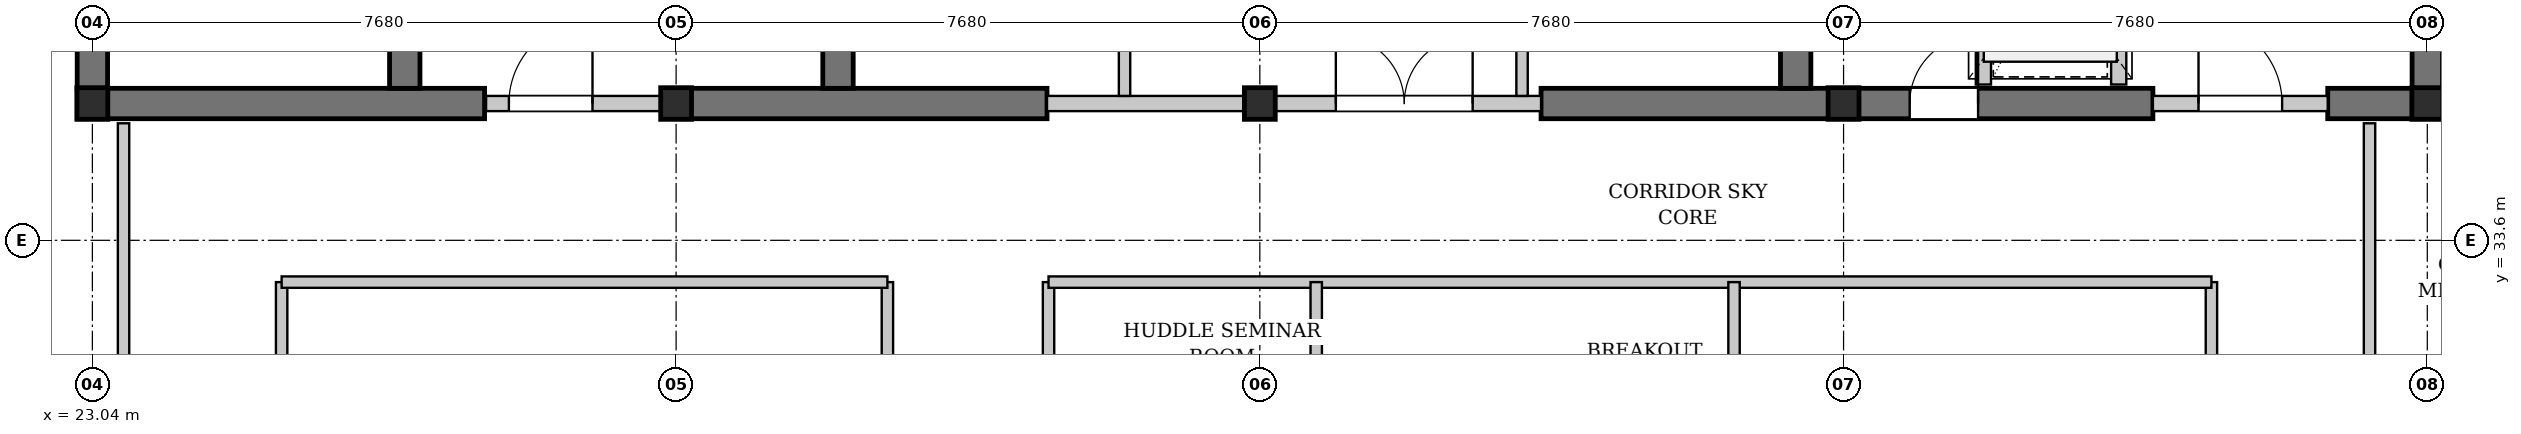
"""IFC4 building model, lengths in metres.
Left out: names, types, materials, properties, quantities, classifications, styles, units other than length and angle.
Written with IfcOpenShell. Run it as: python <this file> out.ifc"""

import sys

from ifc_helpers import new_model, si_unit, direction, frame, frame_2d, origin, origin_2d, place, context, subcontext, project, spatial, rectangle, i_section, extrude, element, fill, save


model = new_model("IFC4")
c1 = context("Model", 3, precision=1e-05, world=origin(), true_north=direction((0.0, 1.0)))
c2 = subcontext(c1, "Body", "Model", "MODEL_VIEW")
j1 = project(units=[si_unit("LENGTHUNIT", "METRE"), si_unit("PLANEANGLEUNIT", "RADIAN")], contexts=[c1])
p1 = place(None, origin())
s1 = spatial("IfcSite", under=j1, at=p1, CompositionType="ELEMENT")
p2 = place(p1, origin())
s2 = spatial("IfcBuilding", under=s1, at=p2, CompositionType="ELEMENT")
p3 = place(p2, frame((0.0, 0.0, 265.9)))
s3 = spatial("IfcBuildingStorey", under=s2, at=p3, CompositionType="ELEMENT", Elevation=265.9)
p4 = place(p3, frame((22.84, 35.4, 0.0), z_axis=(0.0, 0.0, 1.0), x_axis=(1.0, 0.0, 0.0)))
e1 = element("IfcWall", 1, at=p4, inside=s3, PredefinedType="SHEAR", context=c2, shape_type="SweptSolid", body=[
    extrude(rectangle(XDim=5.36, YDim=0.4, at=frame_2d((2.68, 0.0))), origin(), (0.0, 0.0, 1.0), 3.18),
])
p5 = place(p3, frame((30.72, 35.4, 0.0), z_axis=(0.0, 0.0, 1.0), x_axis=(1.0, 0.0, 0.0)))
e2 = element("IfcWall", 2, at=p5, inside=s3, PredefinedType="SHEAR", context=c2, shape_type="SweptSolid", body=[
    extrude(rectangle(XDim=4.88, YDim=0.4, at=frame_2d((2.44, 0.0))), origin(), (0.0, 0.0, 1.0), 3.18),
])
p6 = place(p3, frame((42.1, 35.4, 0.0), z_axis=(0.0, 0.0, 1.0), x_axis=(1.0, 0.0, 0.0)))
e3 = element("IfcWall", 3, at=p6, inside=s3, PredefinedType="SHEAR", context=c2, shape_type="SweptSolid", body=[
    extrude(rectangle(XDim=8.05, YDim=0.4, at=frame_2d((4.025, 0.0))), origin(), (0.0, 0.0, 1.0), 3.18),
])
p7 = place(p6, frame((4.85, 0.0, 0.0)))
e4 = element("IfcOpeningElement", 4, at=p7, cuts=e3, PredefinedType="OPENING", context=c2, shape_type="SweptSolid", body=[
    extrude(rectangle(XDim=0.9, YDim=2.15, at=frame_2d((0.45, 1.075))), frame((0.0, 0.21, 0.0), z_axis=(0.0, -1.0, 0.0), x_axis=(1.0, 0.0, 0.0)), (0.0, 0.0, 1.0), 0.42),
])
p8 = place(p3, frame((52.45, 35.4, 0.0), z_axis=(0.0, 0.0, 1.0), x_axis=(1.0, 0.0, 0.0)))
e5 = element("IfcWall", 5, at=p8, inside=s3, PredefinedType="SHEAR", context=c2, shape_type="SweptSolid", body=[
    extrude(rectangle(XDim=1.51, YDim=0.4, at=frame_2d((0.755, 0.0))), origin(), (0.0, 0.0, 1.0), 3.18),
])
p9 = place(p3, frame((23.04, 35.6, 0.0), z_axis=(0.0, 0.0, 1.0), x_axis=(0.0, 1.0, 0.0)))
e6 = element("IfcWall", 6, at=p9, inside=s3, PredefinedType="SHEAR", context=c2, shape_type="SweptSolid", body=[
    extrude(rectangle(XDim=10.4, YDim=0.4, at=frame_2d((5.2, 0.0))), origin(), (0.0, 0.0, 1.0), 3.18),
])
p10 = place(p3, frame((27.15, 35.6, 0.0), z_axis=(0.0, 0.0, 1.0), x_axis=(0.0, 1.0, 0.0)))
e7 = element("IfcWall", 7, at=p10, inside=s3, PredefinedType="SHEAR", context=c2, shape_type="SweptSolid", body=[
    extrude(rectangle(XDim=10.4, YDim=0.4, at=frame_2d((5.2, 0.0))), origin(), (0.0, 0.0, 1.0), 3.18),
])
p11 = place(p10, frame((0.7, 0.0, 0.0)))
e8 = element("IfcOpeningElement", 8, at=p11, cuts=e7, PredefinedType="OPENING", context=c2, shape_type="SweptSolid", body=[
    extrude(rectangle(XDim=1.1, YDim=2.15, at=frame_2d((0.55, 1.075))), frame((0.0, 0.21, 0.0), z_axis=(0.0, -1.0, 0.0), x_axis=(1.0, 0.0, 0.0)), (0.0, 0.0, 1.0), 0.42),
])
for number, where, z_axis, x_axis in (
    (9, (32.85, 35.6, 0.0), (0.0, 0.0, 1.0), (0.0, 1.0, 0.0)),
    (10, (45.45, 35.6, 0.0), (0.0, 0.0, 1.0), (0.0, 1.0, 0.0)),
    (11, (53.76, 35.6, 0.0), (0.0, 0.0, 1.0), (0.0, 1.0, 0.0)),
):
    element("IfcWall", number, at=place(p3, frame(where, z_axis=z_axis, x_axis=x_axis)), inside=s3, PredefinedType="SHEAR", context=c2, shape_type="SweptSolid", body=[
        extrude(rectangle(XDim=10.4, YDim=0.4, at=frame_2d((5.2, 0.0))), origin(), (0.0, 0.0, 1.0), 3.18),
    ])
for number, where, z_axis, x_axis in (
    (12, (23.04, 35.4, 0.0), (0.0, 0.0, 1.0), (1.0, 0.0, 0.0)),
    (13, (30.72, 35.4, 0.0), (0.0, 0.0, 1.0), (1.0, 0.0, 0.0)),
    (14, (38.4, 35.4, 0.0), (0.0, 0.0, 1.0), (1.0, 0.0, 0.0)),
    (15, (46.08, 35.4, 0.0), (0.0, 0.0, 1.0), (1.0, 0.0, 0.0)),
    (16, (53.76, 35.4, 0.0), (0.0, 0.0, 1.0), (1.0, 0.0, 0.0)),
):
    element("IfcColumn", number, at=place(p3, frame(where, z_axis=z_axis, x_axis=x_axis)), inside=s3, PredefinedType="COLUMN", context=c2, shape_type="SweptSolid", body=[
        extrude(i_section(OverallWidth=0.406, OverallDepth=0.416, WebThickness=0.03, FlangeThickness=0.048, FilletRadius=0.015, at=origin_2d()), origin(), (0.0, 0.0, 1.0), 3.4),
    ])
p12 = place(p3, frame((28.22, 35.4, 0.0), z_axis=(0.0, 0.0, 1.0), x_axis=(1.0, 0.0, 0.0)))
e17 = element("IfcWall", 17, at=p12, inside=s3, PredefinedType="PARTITIONING", context=c2, shape_type="SweptSolid", body=[
    extrude(rectangle(XDim=2.5, YDim=0.2, at=frame_2d((1.25, 0.0))), origin(), (0.0, 0.0, 1.0), 2.575),
])
p13 = place(p12, frame((0.3, 0.0, 0.0)))
e18 = element("IfcOpeningElement", 18, at=p13, cuts=e17, PredefinedType="OPENING", context=c2, shape_type="SweptSolid", body=[
    extrude(rectangle(XDim=1.1, YDim=2.15, at=frame_2d((0.55, 1.075))), frame((0.0, 0.11, 0.0), z_axis=(0.0, -1.0, 0.0), x_axis=(1.0, 0.0, 0.0)), (0.0, 0.0, 1.0), 0.22),
])
p14 = place(p3, frame((35.6, 35.4, 0.0), z_axis=(0.0, 0.0, 1.0), x_axis=(1.0, 0.0, 0.0)))
e19 = element("IfcWall", 19, at=p14, inside=s3, PredefinedType="PARTITIONING", context=c2, shape_type="SweptSolid", body=[
    extrude(rectangle(XDim=6.5, YDim=0.2, at=frame_2d((3.25, 0.0))), origin(), (0.0, 0.0, 1.0), 2.575),
])
p15 = place(p14, frame((3.8, 0.0, 0.0)))
e20 = element("IfcOpeningElement", 20, at=p15, cuts=e19, PredefinedType="OPENING", context=c2, shape_type="SweptSolid", body=[
    extrude(rectangle(XDim=1.8, YDim=2.3, at=frame_2d((0.9, 1.15))), frame((0.0, 0.11, 0.0), z_axis=(0.0, -1.0, 0.0), x_axis=(1.0, 0.0, 0.0)), (0.0, 0.0, 1.0), 0.22),
])
p16 = place(p3, frame((36.62, 35.5, 0.0), z_axis=(0.0, 0.0, 1.0), x_axis=(0.0, 1.0, 0.0)))
e21 = element("IfcWall", 21, at=p16, inside=s3, PredefinedType="PARTITIONING", context=c2, shape_type="SweptSolid", body=[
    extrude(rectangle(XDim=10.42, YDim=0.15, at=frame_2d((5.21, 0.0))), origin(), (0.0, 0.0, 1.0), 3.18),
])
p17 = place(p16, frame((3.92, 0.0, 0.0)))
e22 = element("IfcOpeningElement", 22, at=p17, cuts=e21, PredefinedType="OPENING", context=c2, shape_type="SweptSolid", body=[
    extrude(rectangle(XDim=0.9, YDim=2.15, at=frame_2d((0.45, 1.075))), frame((0.0, 0.085, 0.0), z_axis=(0.0, -1.0, 0.0), x_axis=(1.0, 0.0, 0.0)), (0.0, 0.0, 1.0), 0.17),
])
p18 = place(p16, frame((5.85, 0.0, 0.0)))
e23 = element("IfcOpeningElement", 23, at=p18, cuts=e21, PredefinedType="OPENING", context=c2, shape_type="SweptSolid", body=[
    extrude(rectangle(XDim=0.9, YDim=2.15, at=frame_2d((0.45, 1.075))), frame((0.0, 0.085, 0.0), z_axis=(0.0, -1.0, 0.0), x_axis=(1.0, 0.0, 0.0)), (0.0, 0.0, 1.0), 0.17),
])
p19 = place(p3, frame((41.85, 35.5, 0.0), z_axis=(0.0, 0.0, 1.0), x_axis=(0.0, 1.0, 0.0)))
e24 = element("IfcWall", 24, at=p19, inside=s3, PredefinedType="PARTITIONING", context=c2, shape_type="SweptSolid", body=[
    extrude(rectangle(XDim=10.42, YDim=0.15, at=frame_2d((5.21, 0.0))), origin(), (0.0, 0.0, 1.0), 3.18),
])
p20 = place(p19, frame((3.92, 0.0, 0.0)))
e25 = element("IfcOpeningElement", 25, at=p20, cuts=e24, PredefinedType="OPENING", context=c2, shape_type="SweptSolid", body=[
    extrude(rectangle(XDim=0.9, YDim=2.15, at=frame_2d((0.45, 1.075))), frame((0.0, 0.085, 0.0), z_axis=(0.0, -1.0, 0.0), x_axis=(1.0, 0.0, 0.0)), (0.0, 0.0, 1.0), 0.17),
])
p21 = place(p19, frame((5.85, 0.0, 0.0)))
e26 = element("IfcOpeningElement", 26, at=p21, cuts=e24, PredefinedType="OPENING", context=c2, shape_type="SweptSolid", body=[
    extrude(rectangle(XDim=0.9, YDim=2.15, at=frame_2d((0.45, 1.075))), frame((0.0, 0.085, 0.0), z_axis=(0.0, -1.0, 0.0), x_axis=(1.0, 0.0, 0.0)), (0.0, 0.0, 1.0), 0.17),
])
p22 = place(p3, frame((50.15, 35.4, 0.0), z_axis=(0.0, 0.0, 1.0), x_axis=(1.0, 0.0, 0.0)))
e27 = element("IfcWall", 27, at=p22, inside=s3, PredefinedType="PARTITIONING", context=c2, shape_type="SweptSolid", body=[
    extrude(rectangle(XDim=2.3, YDim=0.2, at=frame_2d((1.15, 0.0))), origin(), (0.0, 0.0, 1.0), 2.575),
])
p23 = place(p22, frame((0.6, 0.0, 0.0)))
e28 = element("IfcOpeningElement", 28, at=p23, cuts=e27, PredefinedType="OPENING", context=c2, shape_type="SweptSolid", body=[
    extrude(rectangle(XDim=1.1, YDim=2.15, at=frame_2d((0.55, 1.075))), frame((0.0, 0.11, 0.0), z_axis=(0.0, -1.0, 0.0), x_axis=(1.0, 0.0, 0.0)), (0.0, 0.0, 1.0), 0.22),
])
p24 = place(p3, frame((49.7, 35.65, 0.0), z_axis=(0.0, 0.0, 1.0), x_axis=(0.0, 1.0, 0.0)))
e29 = element("IfcWall", 29, at=p24, inside=s3, PredefinedType="PARTITIONING", context=c2, shape_type="SweptSolid", body=[
    extrude(rectangle(XDim=3.15, YDim=0.2, at=frame_2d((1.575, 0.0))), origin(), (0.0, 0.0, 1.0), 3.18),
])
p25 = place(p24, frame((0.85, 0.0, 0.0)))
e30 = element("IfcOpeningElement", 30, at=p25, cuts=e29, PredefinedType="OPENING", context=c2, shape_type="SweptSolid", body=[
    extrude(rectangle(XDim=1.2, YDim=2.2, at=frame_2d((0.6, 1.1))), frame((0.0, 0.11, 0.0), z_axis=(0.0, -1.0, 0.0), x_axis=(1.0, 0.0, 0.0)), (0.0, 0.0, 1.0), 0.22),
])
p26 = place(p3, frame((47.92, 35.65, 0.0), z_axis=(0.0, 0.0, 1.0), x_axis=(0.0, 1.0, 0.0)))
e31 = element("IfcWall", 31, at=p26, inside=s3, PredefinedType="PARTITIONING", context=c2, shape_type="SweptSolid", body=[
    extrude(rectangle(XDim=3.15, YDim=0.2, at=frame_2d((1.575, 0.0))), origin(), (0.0, 0.0, 1.0), 3.18),
])
p27 = place(p3, frame((23.45, 28.25, 0.0), z_axis=(0.0, 0.0, 1.0), x_axis=(0.0, 1.0, 0.0)))
e32 = element("IfcWall", 32, at=p27, inside=s3, PredefinedType="PARTITIONING", context=c2, shape_type="SweptSolid", body=[
    extrude(rectangle(XDim=6.89, YDim=0.15, at=frame_2d((3.445, 0.0))), origin(), (0.0, 0.0, 1.0), 3.18),
])
p28 = place(p27, frame((1.03, 0.0, 0.0)))
e33 = element("IfcOpeningElement", 33, at=p28, cuts=e32, PredefinedType="OPENING", context=c2, shape_type="SweptSolid", body=[
    extrude(rectangle(XDim=0.9, YDim=2.15, at=frame_2d((0.45, 1.075))), frame((0.0, 0.085, 0.0), z_axis=(0.0, -1.0, 0.0), x_axis=(1.0, 0.0, 0.0)), (0.0, 0.0, 1.0), 0.17),
])
p29 = place(p3, frame((53.0, 28.25, 0.0), z_axis=(0.0, 0.0, 1.0), x_axis=(0.0, 1.0, 0.0)))
e34 = element("IfcWall", 34, at=p29, inside=s3, PredefinedType="PARTITIONING", context=c2, shape_type="SweptSolid", body=[
    extrude(rectangle(XDim=6.89, YDim=0.15, at=frame_2d((3.445, 0.0))), origin(), (0.0, 0.0, 1.0), 3.18),
])
p30 = place(p29, frame((1.03, 0.0, 0.0)))
e35 = element("IfcOpeningElement", 35, at=p30, cuts=e34, PredefinedType="OPENING", context=c2, shape_type="SweptSolid", body=[
    extrude(rectangle(XDim=0.9, YDim=2.15, at=frame_2d((0.45, 1.075))), frame((0.0, 0.085, 0.0), z_axis=(0.0, -1.0, 0.0), x_axis=(1.0, 0.0, 0.0)), (0.0, 0.0, 1.0), 0.17),
])
for number, where, z_axis, x_axis in (
    (36, (25.53, 30.33, 0.0), (0.0, 0.0, 1.0), (0.0, 1.0, 0.0)),
    (37, (50.92, 30.33, 0.0), (0.0, 0.0, 1.0), (0.0, 1.0, 0.0)),
    (38, (33.5, 30.33, 0.0), (0.0, 0.0, 1.0), (0.0, 1.0, 0.0)),
    (39, (35.62, 30.33, 0.0), (0.0, 0.0, 1.0), (0.0, 1.0, 0.0)),
):
    element("IfcWall", number, at=place(p3, frame(where, z_axis=z_axis, x_axis=x_axis)), inside=s3, PredefinedType="PARTITIONING", context=c2, shape_type="SweptSolid", body=[
        extrude(rectangle(XDim=2.72, YDim=0.15, at=frame_2d((1.36, 0.0))), origin(), (0.0, 0.0, 1.0), 3.18),
    ])
p31 = place(p3, frame((25.53, 33.05, 0.0), z_axis=(0.0, 0.0, 1.0), x_axis=(1.0, 0.0, 0.0)))
e40 = element("IfcWall", 40, at=p31, inside=s3, PredefinedType="PARTITIONING", context=c2, shape_type="SweptSolid", body=[
    extrude(rectangle(XDim=7.97, YDim=0.15, at=frame_2d((3.985, 0.0))), origin(), (0.0, 0.0, 1.0), 3.18),
])
p32 = place(p3, frame((35.62, 33.05, 0.0), z_axis=(0.0, 0.0, 1.0), x_axis=(1.0, 0.0, 0.0)))
e41 = element("IfcWall", 41, at=p32, inside=s3, PredefinedType="PARTITIONING", context=c2, shape_type="SweptSolid", body=[
    extrude(rectangle(XDim=15.3, YDim=0.15, at=frame_2d((7.65, 0.0))), origin(), (0.0, 0.0, 1.0), 3.18),
])
for number, where, z_axis, x_axis in (
    (42, (39.142, 30.33, 0.0), (0.0, 0.0, 1.0), (0.0, 1.0, 0.0)),
    (43, (44.639, 30.33, 0.0), (0.0, 0.0, 1.0), (0.0, 1.0, 0.0)),
):
    element("IfcWall", number, at=place(p3, frame(where, z_axis=z_axis, x_axis=x_axis)), inside=s3, PredefinedType="PARTITIONING", context=c2, shape_type="SweptSolid", body=[
        extrude(rectangle(XDim=2.72, YDim=0.15, at=frame_2d((1.36, 0.0))), origin(), (0.0, 0.0, 1.0), 3.18),
    ])
p33 = place(p13, origin())
e44 = element("IfcDoor", 44, at=p33, inside=s3, OperationType="SINGLE_SWING_RIGHT", PredefinedType="DOOR", context=c2, shape_type="SweptSolid", body=[
    extrude(rectangle(XDim=1.1, YDim=2.15, at=frame_2d((0.55, 1.075))), frame((0.0, 0.025, 0.0), z_axis=(0.0, -1.0, 0.0), x_axis=(1.0, 0.0, 0.0)), (0.0, 0.0, 1.0), 0.05),
])
fill(e18, e44)
p34 = place(p15, origin())
e45 = element("IfcDoor", 45, at=p34, inside=s3, OperationType="DOUBLE_DOOR_SINGLE_SWING", PredefinedType="DOOR", context=c2, shape_type="SweptSolid", body=[
    extrude(rectangle(XDim=1.8, YDim=2.3, at=frame_2d((0.9, 1.15))), frame((0.0, 0.025, 0.0), z_axis=(0.0, -1.0, 0.0), x_axis=(1.0, 0.0, 0.0)), (0.0, 0.0, 1.0), 0.05),
])
fill(e20, e45)
p35 = place(p23, origin())
e46 = element("IfcDoor", 46, at=p35, inside=s3, OperationType="SINGLE_SWING_LEFT", PredefinedType="DOOR", context=c2, shape_type="SweptSolid", body=[
    extrude(rectangle(XDim=1.1, YDim=2.15, at=frame_2d((0.55, 1.075))), frame((0.0, 0.025, 0.0), z_axis=(0.0, -1.0, 0.0), x_axis=(1.0, 0.0, 0.0)), (0.0, 0.0, 1.0), 0.05),
])
fill(e28, e46)
p36 = place(p7, origin())
e47 = element("IfcDoor", 47, at=p36, inside=s3, OperationType="SINGLE_SWING_RIGHT", PredefinedType="DOOR", context=c2, shape_type="SweptSolid", body=[
    extrude(rectangle(XDim=0.9, YDim=2.15, at=frame_2d((0.45, 1.075))), frame((0.0, 0.025, 0.0), z_axis=(0.0, -1.0, 0.0), x_axis=(1.0, 0.0, 0.0)), (0.0, 0.0, 1.0), 0.05),
])
fill(e4, e47)
save(model, sys.argv[1])
